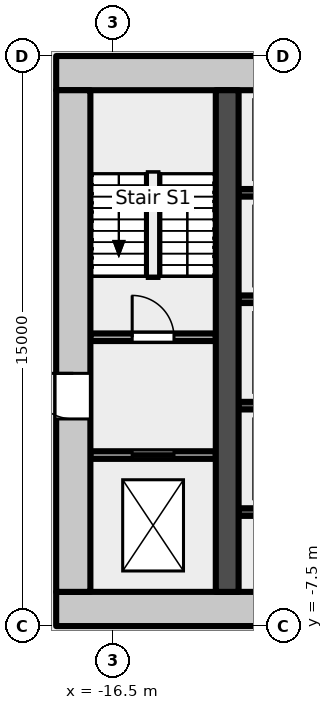
"""IFC4 building model, lengths in metres.
Left out: names, types, materials, properties, quantities, classifications, styles, units other than length and angle.
Written with IfcOpenShell. Run it as: python <this file> out.ifc"""

import sys

from ifc_helpers import new_model, si_unit, direction, frame, frame_2d, origin, place, context, subcontext, project, spatial, rectangle, extrude, element, fill, save


model = new_model("IFC4")
c1 = context("Model", 3, precision=1e-05, world=origin(), true_north=direction((0.0, 1.0)))
c2 = subcontext(c1, "Body", "Model", "MODEL_VIEW")
j1 = project(units=[si_unit("LENGTHUNIT", "METRE"), si_unit("PLANEANGLEUNIT", "RADIAN")], contexts=[c1])
p1 = place(None, origin())
s1 = spatial("IfcSite", under=j1, at=p1, CompositionType="ELEMENT")
p2 = place(p1, origin())
s2 = spatial("IfcBuilding", under=s1, at=p2, CompositionType="ELEMENT")
p3 = place(p2, origin())
s3 = spatial("IfcBuildingStorey", under=s2, at=p3, CompositionType="ELEMENT", Elevation=0.0)
p4 = place(p3, frame((-18.0, -7.05, -0.2), z_axis=(0.0, 0.0, 1.0), x_axis=(1.0, 0.0, 0.0)))
e1 = element("IfcWall", 1, at=p4, inside=s3, PredefinedType="SHEAR", context=c2, shape_type="SweptSolid", body=[
    extrude(rectangle(XDim=36.0, YDim=0.9, at=frame_2d((18.0, 0.0))), origin(), (0.0, 0.0, 1.0), 7.2),
])
p5 = place(p4, frame((7.8, 0.0, 0.2)))
e2 = element("IfcOpeningElement", 2, at=p5, cuts=e1, PredefinedType="OPENING", context=c2, shape_type="SweptSolid", body=[
    extrude(rectangle(XDim=2.4, YDim=2.1, at=frame_2d((1.2, 1.05))), frame((0.0, 0.46, 0.0), z_axis=(0.0, -1.0, 0.0), x_axis=(1.0, 0.0, 0.0)), (0.0, 0.0, 1.0), 0.921),
])
p6 = place(p4, frame((16.8, 0.0, 0.2)))
e3 = element("IfcOpeningElement", 3, at=p6, cuts=e1, PredefinedType="OPENING", context=c2, shape_type="SweptSolid", body=[
    extrude(rectangle(XDim=2.4, YDim=2.1, at=frame_2d((1.2, 1.05))), frame((0.0, 0.46, 0.0), z_axis=(0.0, -1.0, 0.0), x_axis=(1.0, 0.0, 0.0)), (0.0, 0.0, 1.0), 0.921),
])
p7 = place(p4, frame((26.1, 0.0, 0.2)))
e4 = element("IfcOpeningElement", 4, at=p7, cuts=e1, PredefinedType="OPENING", context=c2, shape_type="SweptSolid", body=[
    extrude(rectangle(XDim=2.4, YDim=2.1, at=frame_2d((1.2, 1.05))), frame((0.0, 0.46, 0.0), z_axis=(0.0, -1.0, 0.0), x_axis=(1.0, 0.0, 0.0)), (0.0, 0.0, 1.0), 0.921),
])
p8 = place(p3, frame((-18.0, 7.05, -0.2), z_axis=(0.0, 0.0, 1.0), x_axis=(1.0, 0.0, 0.0)))
e5 = element("IfcWall", 5, at=p8, inside=s3, PredefinedType="SHEAR", context=c2, shape_type="SweptSolid", body=[
    extrude(rectangle(XDim=36.0, YDim=0.9, at=frame_2d((18.0, 0.0))), origin(), (0.0, 0.0, 1.0), 7.2),
])
p9 = place(p3, frame((-17.55, -6.6, -0.2), z_axis=(0.0, 0.0, 1.0), x_axis=(0.0, 1.0, 0.0)))
e6 = element("IfcWall", 6, at=p9, inside=s3, PredefinedType="SHEAR", context=c2, shape_type="SweptSolid", body=[
    extrude(rectangle(XDim=13.2, YDim=0.9, at=frame_2d((6.6, 0.0))), origin(), (0.0, 0.0, 1.0), 7.2),
])
p10 = place(p9, frame((4.55, 0.0, 0.2)))
e7 = element("IfcOpeningElement", 7, at=p10, cuts=e6, PredefinedType="OPENING", context=c2, shape_type="SweptSolid", body=[
    extrude(rectangle(XDim=1.2, YDim=2.1, at=frame_2d((0.6, 1.05))), frame((0.0, 0.46, 0.0), z_axis=(0.0, -1.0, 0.0), x_axis=(1.0, 0.0, 0.0)), (0.0, 0.0, 1.0), 0.921),
])
p11 = place(p3, frame((-13.5, -6.6, -0.2), z_axis=(0.0, 0.0, 1.0), x_axis=(0.0, 1.0, 0.0)))
e8 = element("IfcWall", 8, at=p11, inside=s3, PredefinedType="SHEAR", context=c2, shape_type="SweptSolid", body=[
    extrude(rectangle(XDim=13.2, YDim=0.6, at=frame_2d((6.6, 0.0))), origin(), (0.0, 0.0, 1.0), 7.2),
])
p12 = place(p3, frame((-17.1, -3.0, 0.0), z_axis=(0.0, 0.0, 1.0), x_axis=(1.0, 0.0, 0.0)))
e9 = element("IfcWall", 9, at=p12, inside=s3, PredefinedType="PARTITIONING", context=c2, shape_type="SweptSolid", body=[
    extrude(rectangle(XDim=3.3, YDim=0.2, at=frame_2d((1.65, 0.0))), origin(), (0.0, 0.0, 1.0), 7.0),
])
p13 = place(p12, frame((1.1, 0.0, 0.0)))
e10 = element("IfcOpeningElement", 10, at=p13, cuts=e9, PredefinedType="OPENING", context=c2, shape_type="SweptSolid", body=[
    extrude(rectangle(XDim=1.1, YDim=2.1, at=frame_2d((0.55, 1.05))), frame((0.0, 0.111, 0.0), z_axis=(0.0, -1.0, 0.0), x_axis=(1.0, 0.0, 0.0)), (0.0, 0.0, 1.0), 0.221),
])
p14 = place(p3, frame((-17.1, 0.1, 0.0), z_axis=(0.0, 0.0, 1.0), x_axis=(1.0, 0.0, 0.0)))
e11 = element("IfcWall", 11, at=p14, inside=s3, PredefinedType="PARTITIONING", context=c2, shape_type="SweptSolid", body=[
    extrude(rectangle(XDim=3.3, YDim=0.2, at=frame_2d((1.65, 0.0))), origin(), (0.0, 0.0, 1.0), 7.0),
])
p15 = place(p14, frame((1.1, 0.0, 0.0)))
e12 = element("IfcOpeningElement", 12, at=p15, cuts=e11, PredefinedType="OPENING", context=c2, shape_type="SweptSolid", body=[
    extrude(rectangle(XDim=1.1, YDim=2.1, at=frame_2d((0.55, 1.05))), frame((0.0, 0.111, 0.0), z_axis=(0.0, -1.0, 0.0), x_axis=(1.0, 0.0, 0.0)), (0.0, 0.0, 1.0), 0.221),
])
for number, where, z_axis, x_axis in (
    (13, (-13.2, -1.7, 0.0), (0.0, 0.0, 1.0), (1.0, 0.0, 0.0)),
    (14, (-13.2, 1.1, 0.0), (0.0, 0.0, 1.0), (1.0, 0.0, 0.0)),
    (15, (-13.2, 3.9, 0.0), (0.0, 0.0, 1.0), (1.0, 0.0, 0.0)),
    (16, (-13.2, -4.5, 0.0), (0.0, 0.0, 1.0), (1.0, 0.0, 0.0)),
):
    element("IfcWall", number, at=place(p3, frame(where, z_axis=z_axis, x_axis=x_axis)), inside=s3, PredefinedType="PARTITIONING", context=c2, shape_type="SweptSolid", body=[
        extrude(rectangle(XDim=2.3, YDim=0.2, at=frame_2d((1.15, 0.0))), origin(), (0.0, 0.0, 1.0), 7.0),
    ])
p16 = place(p13, origin())
e17 = element("IfcDoor", 17, at=p16, inside=s3, OperationType="DOUBLE_DOOR_SLIDING", PredefinedType="DOOR", context=c2, shape_type="SweptSolid", body=[
    extrude(rectangle(XDim=1.1, YDim=2.1, at=frame_2d((0.55, 1.05))), frame((0.0, 0.025, 0.0), z_axis=(0.0, -1.0, 0.0), x_axis=(1.0, 0.0, 0.0)), (0.0, 0.0, 1.0), 0.05),
])
fill(e10, e17)
p17 = place(p10, origin())
e18 = element("IfcDoor", 18, at=p17, inside=s3, OperationType="SINGLE_SWING_RIGHT", PredefinedType="DOOR", context=c2, shape_type="SweptSolid", body=[
    extrude(rectangle(XDim=1.2, YDim=2.1, at=frame_2d((0.6, 1.05))), frame((0.0, 0.025, 0.0), z_axis=(0.0, -1.0, 0.0), x_axis=(1.0, 0.0, 0.0)), (0.0, 0.0, 1.0), 0.05),
])
fill(e7, e18)
p18 = place(p15, origin())
e19 = element("IfcDoor", 19, at=p18, inside=s3, OperationType="SINGLE_SWING_LEFT", PredefinedType="DOOR", context=c2, shape_type="SweptSolid", body=[
    extrude(rectangle(XDim=1.1, YDim=2.1, at=frame_2d((0.55, 1.05))), frame((0.0, 0.025, 0.0), z_axis=(0.0, -1.0, 0.0), x_axis=(1.0, 0.0, 0.0)), (0.0, 0.0, 1.0), 0.05),
])
fill(e12, e19)
save(model, sys.argv[1])
